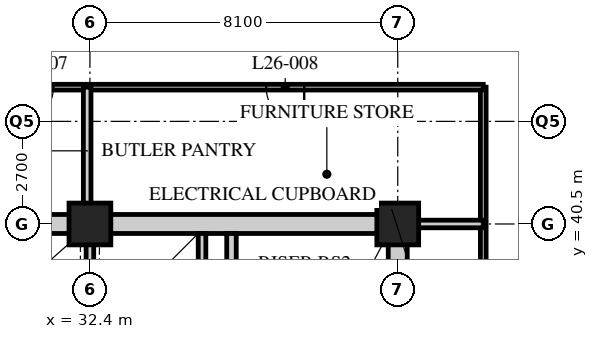
"""IFC4 building model, lengths in metres.
Left out: names, types, materials, properties, quantities, classifications, styles, units other than length and angle.
Written with IfcOpenShell. Run it as: python <this file> out.ifc"""

import sys

from ifc_helpers import new_model, si_unit, direction, frame, frame_2d, origin, origin_2d, place, context, subcontext, project, spatial, rectangle, hollow_rectangle, extrude, element, fill, save


model = new_model("IFC4")
c1 = context("Model", 3, precision=1e-05, world=origin(), true_north=direction((0.0, 1.0)))
c2 = subcontext(c1, "Body", "Model", "MODEL_VIEW")
j1 = project(units=[si_unit("LENGTHUNIT", "METRE"), si_unit("PLANEANGLEUNIT", "RADIAN")], contexts=[c1])
p1 = place(None, origin())
s1 = spatial("IfcSite", under=j1, at=p1, CompositionType="ELEMENT")
p2 = place(p1, origin())
s2 = spatial("IfcBuilding", under=s1, at=p2, CompositionType="ELEMENT")
p3 = place(p2, frame((0.0, 0.0, 106.8)))
s3 = spatial("IfcBuildingStorey", under=s2, at=p3, CompositionType="ELEMENT", Elevation=106.8)
for number, where, z_axis, x_axis in (
    (1, (32.4, 40.5, 0.0), (0.0, 0.0, 1.0), (1.0, 0.0, 0.0)),
    (2, (40.5, 40.5, 0.0), (0.0, 0.0, 1.0), (1.0, 0.0, 0.0)),
):
    element("IfcColumn", number, at=place(p3, frame(where, z_axis=z_axis, x_axis=x_axis)), inside=s3, PredefinedType="COLUMN", context=c2, shape_type="SweptSolid", body=[
        extrude(hollow_rectangle(XDim=1.1, YDim=1.1, WallThickness=0.1, at=origin_2d()), origin(), (0.0, 0.0, 1.0), 3.4),
    ])
p4 = place(p3, frame((42.75, 24.3, 0.0), z_axis=(0.0, 0.0, 1.0), x_axis=(0.0, 1.0, 0.0)))
e3 = element("IfcWall", 3, at=p4, inside=s3, PredefinedType="PARTITIONING", context=c2, shape_type="SweptSolid", body=[
    extrude(rectangle(XDim=19.8, YDim=0.15, at=frame_2d((9.9, 0.0))), origin(), (0.0, 0.0, 1.0), 3.19),
])
p5 = place(p4, frame((3.55, 0.0, 0.0)))
e4 = element("IfcOpeningElement", 4, at=p5, cuts=e3, PredefinedType="OPENING", context=c2, shape_type="SweptSolid", body=[
    extrude(rectangle(XDim=1.0, YDim=2.1, at=frame_2d((0.5, 1.05))), frame((0.0, 0.085, 0.0), z_axis=(0.0, -1.0, 0.0), x_axis=(1.0, 0.0, 0.0)), (0.0, 0.0, 1.0), 0.17),
])
p6 = place(p4, frame((11.65, 0.0, 0.0)))
e5 = element("IfcOpeningElement", 5, at=p6, cuts=e3, PredefinedType="OPENING", context=c2, shape_type="SweptSolid", body=[
    extrude(rectangle(XDim=1.0, YDim=2.1, at=frame_2d((0.5, 1.05))), frame((0.0, 0.085, 0.0), z_axis=(0.0, -1.0, 0.0), x_axis=(1.0, 0.0, 0.0)), (0.0, 0.0, 1.0), 0.17),
])
p7 = place(p3, frame((42.75, 44.1, 0.0), z_axis=(0.0, 0.0, 1.0), x_axis=(-1.0, 0.0, 0.0)))
e6 = element("IfcWall", 6, at=p7, inside=s3, PredefinedType="PARTITIONING", context=c2, shape_type="SweptSolid", body=[
    extrude(rectangle(XDim=13.19, YDim=0.15, at=frame_2d((6.595, 0.0))), origin(), (0.0, 0.0, 1.0), 3.19),
])
p8 = place(p7, frame((11.311, 0.0, 0.0)))
e7 = element("IfcOpeningElement", 7, at=p8, cuts=e6, PredefinedType="OPENING", context=c2, shape_type="SweptSolid", body=[
    extrude(rectangle(XDim=1.0, YDim=2.1, at=frame_2d((0.5, 1.05))), frame((0.0, 0.085, 0.0), z_axis=(0.0, -1.0, 0.0), x_axis=(1.0, 0.0, 0.0)), (0.0, 0.0, 1.0), 0.17),
])
p9 = place(p7, frame((4.711, 0.0, 0.0)))
e8 = element("IfcOpeningElement", 8, at=p9, cuts=e6, PredefinedType="OPENING", context=c2, shape_type="SweptSolid", body=[
    extrude(rectangle(XDim=1.0, YDim=2.1, at=frame_2d((0.5, 1.05))), frame((0.0, 0.085, 0.0), z_axis=(0.0, -1.0, 0.0), x_axis=(1.0, 0.0, 0.0)), (0.0, 0.0, 1.0), 0.17),
])
p10 = place(p3, frame((32.328, 44.1, 0.0), z_axis=(0.0, 0.0, 1.0), x_axis=(0.0, -1.0, 0.0)))
e9 = element("IfcWall", 9, at=p10, inside=s3, PredefinedType="SOLIDWALL", context=c2, shape_type="SweptSolid", body=[
    extrude(rectangle(XDim=3.6, YDim=0.2, at=frame_2d((1.8, 0.0))), origin(), (0.0, 0.0, 1.0), 2.578),
])
p11 = place(p3, frame((40.5, 40.5, 0.0), z_axis=(0.0, 0.0, 1.0), x_axis=(1.0, 0.0, 0.0)))
e10 = element("IfcWall", 10, at=p11, inside=s3, PredefinedType="SOLIDWALL", context=c2, shape_type="SweptSolid", body=[
    extrude(rectangle(XDim=2.25, YDim=0.2, at=frame_2d((1.125, 0.0))), origin(), (0.0, 0.0, 1.0), 3.19),
])
p12 = place(p3, frame((15.95, 40.5, 0.0), z_axis=(0.0, 0.0, 1.0), x_axis=(1.0, 0.0, 0.0)))
e11 = element("IfcWall", 11, at=p12, inside=s3, PredefinedType="SOLIDWALL", context=c2, shape_type="SweptSolid", body=[
    extrude(rectangle(XDim=24.8, YDim=0.5, at=frame_2d((12.4, 0.0))), origin(), (0.0, 0.0, 1.0), 2.54),
])
p13 = place(p12, frame((11.5, 0.0, 0.0)))
e12 = element("IfcOpeningElement", 12, at=p13, cuts=e11, PredefinedType="OPENING", context=c2, shape_type="SweptSolid", body=[
    extrude(rectangle(XDim=1.8, YDim=2.4, at=frame_2d((0.9, 1.2))), frame((0.0, 0.26, 0.0), z_axis=(0.0, -1.0, 0.0), x_axis=(1.0, 0.0, 0.0)), (0.0, 0.0, 1.0), 0.52),
])
p14 = place(p3, frame((40.5, 24.55, 0.0), z_axis=(0.0, 0.0, 1.0), x_axis=(0.0, 1.0, 0.0)))
e13 = element("IfcWall", 13, at=p14, inside=s3, PredefinedType="SOLIDWALL", context=c2, shape_type="SweptSolid", body=[
    extrude(rectangle(XDim=15.7, YDim=0.5, at=frame_2d((7.85, 0.0))), origin(), (0.0, 0.0, 1.0), 2.578),
])
p15 = place(p3, frame((32.4, 32.5, 0.0), z_axis=(0.0, 0.0, 1.0), x_axis=(0.0, 1.0, 0.0)))
e14 = element("IfcWall", 14, at=p15, inside=s3, PredefinedType="SOLIDWALL", context=c2, shape_type="SweptSolid", body=[
    extrude(rectangle(XDim=7.75, YDim=0.2, at=frame_2d((3.875, 0.0))), origin(), (0.0, 0.0, 1.0), 2.578),
])
p16 = place(p15, frame((1.9, 0.0, 0.0)))
e15 = element("IfcOpeningElement", 15, at=p16, cuts=e14, PredefinedType="OPENING", context=c2, shape_type="SweptSolid", body=[
    extrude(rectangle(XDim=1.2, YDim=2.1, at=frame_2d((0.6, 1.05))), frame((0.0, 0.11, 0.0), z_axis=(0.0, -1.0, 0.0), x_axis=(1.0, 0.0, 0.0)), (0.0, 0.0, 1.0), 0.22),
])
p17 = place(p3, frame((36.125, 32.5, 0.0), z_axis=(0.0, 0.0, 1.0), x_axis=(0.0, 1.0, 0.0)))
e16 = element("IfcWall", 16, at=p17, inside=s3, PredefinedType="SOLIDWALL", context=c2, shape_type="SweptSolid", body=[
    extrude(rectangle(XDim=7.75, YDim=0.25, at=frame_2d((3.875, 0.0))), origin(), (0.0, 0.0, 1.0), 3.19),
])
p18 = place(p17, frame((0.45, 0.0, 0.0)))
e17 = element("IfcOpeningElement", 17, at=p18, cuts=e16, PredefinedType="OPENING", context=c2, shape_type="SweptSolid", body=[
    extrude(rectangle(XDim=1.2, YDim=2.1, at=frame_2d((0.6, 1.05))), frame((0.0, 0.135, 0.0), z_axis=(0.0, -1.0, 0.0), x_axis=(1.0, 0.0, 0.0)), (0.0, 0.0, 1.0), 0.27),
])
p19 = place(p3, frame((35.35, 37.65, 0.0), z_axis=(0.0, 0.0, 1.0), x_axis=(0.0, 1.0, 0.0)))
e18 = element("IfcWall", 18, at=p19, inside=s3, PredefinedType="SOLIDWALL", context=c2, shape_type="SweptSolid", body=[
    extrude(rectangle(XDim=2.6, YDim=0.2, at=frame_2d((1.3, 0.0))), origin(), (0.0, 0.0, 1.0), 3.19),
])
p20 = place(p8, origin())
e19 = element("IfcDoor", 19, at=p20, inside=s3, OperationType="SINGLE_SWING_RIGHT", PredefinedType="DOOR", context=c2, shape_type="SweptSolid", body=[
    extrude(rectangle(XDim=1.0, YDim=2.1, at=frame_2d((0.5, 1.05))), frame((0.0, 0.025, 0.0), z_axis=(0.0, -1.0, 0.0), x_axis=(1.0, 0.0, 0.0)), (0.0, 0.0, 1.0), 0.05),
])
fill(e7, e19)
p21 = place(p9, origin())
e20 = element("IfcDoor", 20, at=p21, inside=s3, OperationType="SINGLE_SWING_LEFT", PredefinedType="DOOR", context=c2, shape_type="SweptSolid", body=[
    extrude(rectangle(XDim=1.0, YDim=2.1, at=frame_2d((0.5, 1.05))), frame((0.0, 0.025, 0.0), z_axis=(0.0, -1.0, 0.0), x_axis=(1.0, 0.0, 0.0)), (0.0, 0.0, 1.0), 0.05),
])
fill(e8, e20)
save(model, sys.argv[1])
